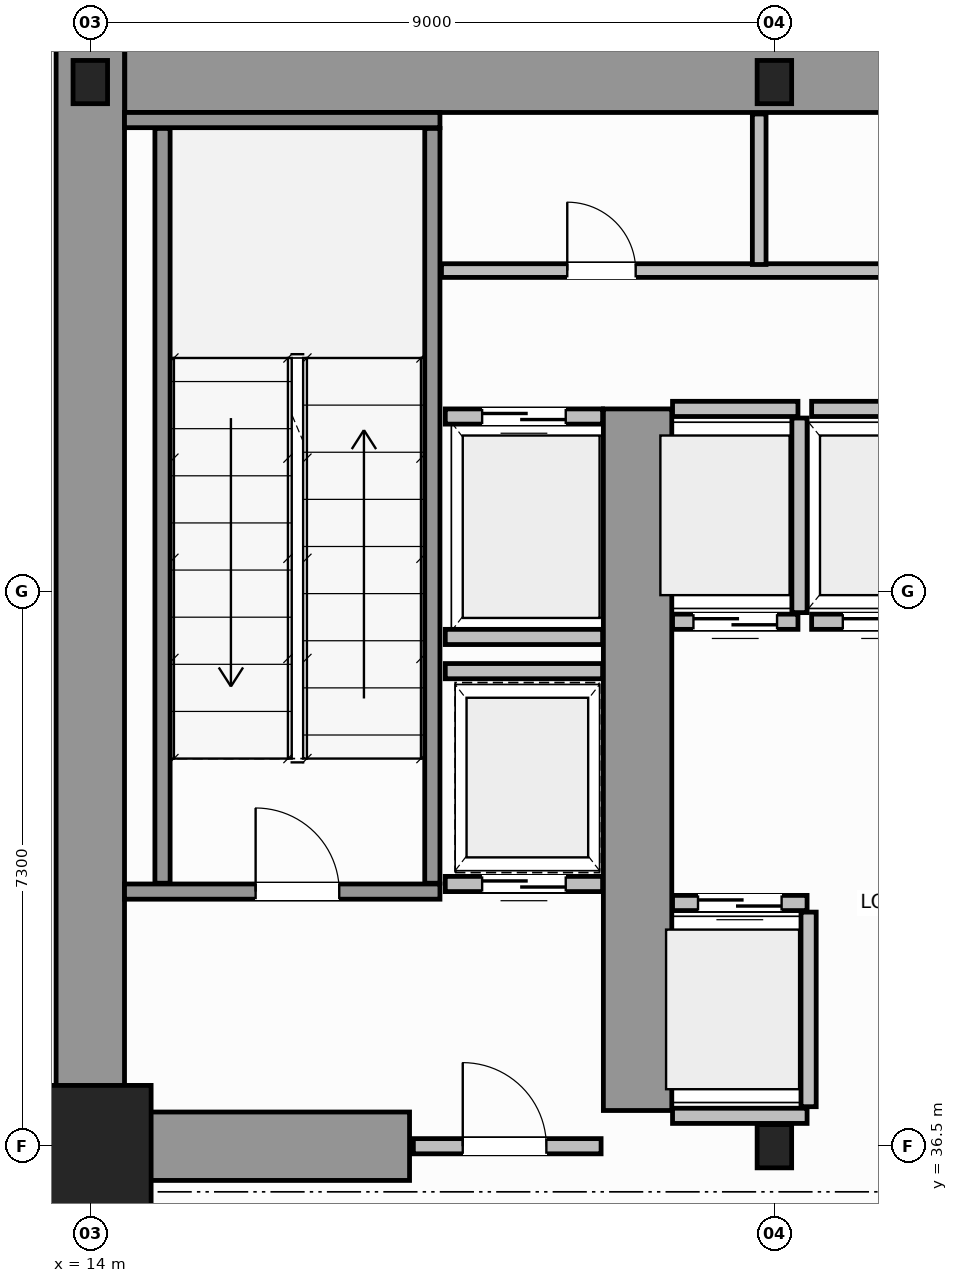
"""IFC4 building model, lengths in metres.
Left out: names, types, materials, properties, quantities, classifications, styles, units other than length and angle.
Written with IfcOpenShell. Run it as: python <this file> out.ifc"""

import sys

from ifc_helpers import new_model, si_unit, direction, frame, frame_2d, origin, origin_2d, place, context, subcontext, project, spatial, rectangle, i_section, extrude, source, transform, mapped, element, fill, save


model = new_model("IFC4")
c1 = context("Model", 3, precision=1e-05, world=origin(), true_north=direction((0.0, 1.0)))
c2 = subcontext(c1, "Body", "Model", "MODEL_VIEW")
j1 = project(units=[si_unit("LENGTHUNIT", "METRE"), si_unit("PLANEANGLEUNIT", "RADIAN")], contexts=[c1])
p1 = place(None, origin())
s1 = spatial("IfcSite", under=j1, at=p1, CompositionType="ELEMENT")
p2 = place(p1, origin())
s2 = spatial("IfcBuilding", under=s1, at=p2, CompositionType="ELEMENT")
p3 = place(p2, origin())
s3 = spatial("IfcBuildingStorey", under=s2, at=p3, CompositionType="ELEMENT", Elevation=0.0)
m1 = source(origin(), c2, "Body", "SweptSolid", [
    extrude(rectangle(XDim=1.6, YDim=1.6, at=origin_2d()), origin(), (0.0, 0.0, 1.0), 5.6),
])
p4 = place(p3, frame((14.0, 36.5, 0.0), z_axis=(0.0, 0.0, 1.0), x_axis=(1.0, 0.0, 0.0)))
e1 = element("IfcColumn", 1, at=p4, inside=s3, PredefinedType="COLUMN", context=c2, shape_type="MappedRepresentation", body=[
    mapped(m1, transform((0.0, 0.0, 0.0), scale=1.0)),
])
m2 = source(origin(), c2, "Body", "SweptSolid", [
    extrude(i_section(OverallWidth=0.454, OverallDepth=0.569, WebThickness=0.078, FlangeThickness=0.08, FilletRadius=0.015, at=origin_2d()), origin(), (0.0, 0.0, 1.0), 5.6),
])
for number, where, z_axis, x_axis in (
    (2, (23.0, 36.5, 0.0), (0.0, 0.0, 1.0), (1.0, 0.0, 0.0)),
    (3, (14.0, 50.5, 0.0), (0.0, 0.0, 1.0), (1.0, 0.0, 0.0)),
    (4, (23.0, 50.5, 0.0), (0.0, 0.0, 1.0), (1.0, 0.0, 0.0)),
):
    element("IfcColumn", number, at=place(p3, frame(where, z_axis=z_axis, x_axis=x_axis)), inside=s3, PredefinedType="COLUMN", context=c2, shape_type="MappedRepresentation", body=[
        mapped(m2, transform((0.0, 0.0, 0.0), scale=1.0)),
    ])
p5 = place(p3, frame((14.454, 50.55, 0.0), z_axis=(0.0, 0.0, 1.0), x_axis=(1.0, 0.0, 0.0)))
e5 = element("IfcWall", 5, at=p5, inside=s3, PredefinedType="SHEAR", context=c2, shape_type="SweptSolid", body=[
    extrude(rectangle(XDim=19.544, YDim=0.9, at=frame_2d((9.772, 0.0))), origin(), (0.0, 0.0, 1.0), 5.6),
])
p6 = place(p3, frame((14.0, 36.5, 0.0), z_axis=(0.0, 0.0, 1.0), x_axis=(0.0, 1.0, 0.0)))
e6 = element("IfcWall", 6, at=p6, inside=s3, PredefinedType="SHEAR", context=c2, shape_type="SweptSolid", body=[
    extrude(rectangle(XDim=14.5, YDim=0.9, at=frame_2d((7.25, 0.0))), origin(), (0.0, 0.0, 1.0), 5.6),
])
p7 = place(p3, frame((14.47, 36.5, 0.0), z_axis=(0.0, 0.0, 1.0), x_axis=(1.0, 0.0, 0.0)))
e7 = element("IfcWall", 7, at=p7, inside=s3, PredefinedType="SHEAR", context=c2, shape_type="SweptSolid", body=[
    extrude(rectangle(XDim=3.73, YDim=0.9, at=frame_2d((1.865, 0.0))), origin(), (0.0, 0.0, 1.0), 4.12),
])
p8 = place(p3, frame((21.2, 36.97, 0.0), z_axis=(0.0, 0.0, 1.0), x_axis=(0.0, 1.0, 0.0)))
e8 = element("IfcWall", 8, at=p8, inside=s3, PredefinedType="SHEAR", context=c2, shape_type="SweptSolid", body=[
    extrude(rectangle(XDim=9.23, YDim=0.9, at=frame_2d((4.615, 0.0))), origin(), (0.0, 0.0, 1.0), 5.6),
])
p9 = place(p3, frame((14.45, 39.85, 0.0), z_axis=(0.0, 0.0, 1.0), x_axis=(1.0, 0.0, 0.0)))
e9 = element("IfcWall", 9, at=p9, inside=s3, PredefinedType="SOLIDWALL", context=c2, shape_type="SweptSolid", body=[
    extrude(rectangle(XDim=4.15, YDim=0.2, at=frame_2d((2.075, 0.0))), origin(), (0.0, 0.0, 1.0), 5.6),
])
p10 = place(p9, frame((1.725, 0.0, 0.0)))
e10 = element("IfcOpeningElement", 10, at=p10, cuts=e9, PredefinedType="OPENING", context=c2, shape_type="SweptSolid", body=[
    extrude(rectangle(XDim=1.1, YDim=2.15, at=frame_2d((0.55, 1.075))), frame((0.0, 0.11, 0.0), z_axis=(0.0, -1.0, 0.0), x_axis=(1.0, 0.0, 0.0)), (0.0, 0.0, 1.0), 0.22),
])
p11 = place(p3, frame((14.45, 50.0, 0.0), z_axis=(0.0, 0.0, 1.0), x_axis=(1.0, 0.0, 0.0)))
e11 = element("IfcWall", 11, at=p11, inside=s3, PredefinedType="SOLIDWALL", context=c2, shape_type="SweptSolid", body=[
    extrude(rectangle(XDim=4.15, YDim=0.2, at=frame_2d((2.075, 0.0))), origin(), (0.0, 0.0, 1.0), 5.6),
])
for number, where, z_axis, x_axis in (
    (12, (14.95, 39.96, 0.0), (0.0, 0.0, 1.0), (0.0, 1.0, 0.0)),
    (13, (18.5, 39.96, 0.0), (0.0, 0.0, 1.0), (0.0, 1.0, 0.0)),
):
    element("IfcWall", number, at=place(p3, frame(where, z_axis=z_axis, x_axis=x_axis)), inside=s3, PredefinedType="SOLIDWALL", context=c2, shape_type="SweptSolid", body=[
        extrude(rectangle(XDim=9.93, YDim=0.2, at=frame_2d((4.965, 0.0))), origin(), (0.0, 0.0, 1.0), 5.6),
    ])
p12 = place(p3, frame((18.25, 36.5, 0.0), z_axis=(0.0, 0.0, 1.0), x_axis=(1.0, 0.0, 0.0)))
e14 = element("IfcWall", 14, at=p12, inside=s3, PredefinedType="SOLIDWALL", context=c2, shape_type="SweptSolid", body=[
    extrude(rectangle(XDim=2.47, YDim=0.2, at=frame_2d((1.235, 0.0))), origin(), (0.0, 0.0, 1.0), 4.11),
])
p13 = place(p12, frame((0.65, 0.0, 0.0)))
e15 = element("IfcOpeningElement", 15, at=p13, cuts=e14, PredefinedType="OPENING", context=c2, shape_type="SweptSolid", body=[
    extrude(rectangle(XDim=1.1, YDim=2.15, at=frame_2d((0.55, 1.075))), frame((0.0, 0.11, 0.0), z_axis=(0.0, -1.0, 0.0), x_axis=(1.0, 0.0, 0.0)), (0.0, 0.0, 1.0), 0.22),
])
p14 = place(p3, frame((21.66, 39.7, 0.0), z_axis=(0.0, 0.0, 1.0), x_axis=(1.0, 0.0, 0.0)))
e16 = element("IfcWall", 16, at=p14, inside=s3, PredefinedType="SOLIDWALL", context=c2, shape_type="SweptSolid", body=[
    extrude(rectangle(XDim=1.77, YDim=0.2, at=frame_2d((0.885, 0.0))), origin(), (0.0, 0.0, 1.0), 5.32),
])
p15 = place(p14, frame((0.335, 0.0, 0.0)))
e17 = element("IfcOpeningElement", 17, at=p15, cuts=e16, PredefinedType="OPENING", context=c2, shape_type="SweptSolid", body=[
    extrude(rectangle(XDim=1.1, YDim=2.15, at=frame_2d((0.55, 1.075))), frame((0.0, 0.11, 0.0), z_axis=(0.0, -1.0, 0.0), x_axis=(1.0, 0.0, 0.0)), (0.0, 0.0, 1.0), 0.22),
])
p16 = place(p3, frame((21.66, 36.9, 0.0), z_axis=(0.0, 0.0, 1.0), x_axis=(1.0, 0.0, 0.0)))
e18 = element("IfcWall", 18, at=p16, inside=s3, PredefinedType="SOLIDWALL", context=c2, shape_type="SweptSolid", body=[
    extrude(rectangle(XDim=1.77, YDim=0.2, at=frame_2d((0.885, 0.0))), origin(), (0.0, 0.0, 1.0), 4.11),
])
p17 = place(p3, frame((23.45, 37.02, 0.0), z_axis=(0.0, 0.0, 1.0), x_axis=(0.0, 1.0, 0.0)))
e19 = element("IfcWall", 19, at=p17, inside=s3, PredefinedType="SOLIDWALL", context=c2, shape_type="SweptSolid", body=[
    extrude(rectangle(XDim=2.56, YDim=0.2, at=frame_2d((1.28, 0.0))), origin(), (0.0, 0.0, 1.0), 5.32),
])
p18 = place(p3, frame((21.66, 43.4, 0.0), z_axis=(0.0, 0.0, 1.0), x_axis=(1.0, 0.0, 0.0)))
e20 = element("IfcWall", 20, at=p18, inside=s3, PredefinedType="SOLIDWALL", context=c2, shape_type="SweptSolid", body=[
    extrude(rectangle(XDim=1.65, YDim=0.2, at=frame_2d((0.825, 0.0))), origin(), (0.0, 0.0, 1.0), 5.32),
])
p19 = place(p18, frame((0.275, 0.0, 0.0)))
e21 = element("IfcOpeningElement", 21, at=p19, cuts=e20, PredefinedType="OPENING", context=c2, shape_type="SweptSolid", body=[
    extrude(rectangle(XDim=1.1, YDim=2.15, at=frame_2d((0.55, 1.075))), frame((0.0, 0.11, 0.0), z_axis=(0.0, -1.0, 0.0), x_axis=(1.0, 0.0, 0.0)), (0.0, 0.0, 1.0), 0.22),
])
p20 = place(p3, frame((21.66, 46.2, 0.0), z_axis=(0.0, 0.0, 1.0), x_axis=(1.0, 0.0, 0.0)))
e22 = element("IfcWall", 22, at=p20, inside=s3, PredefinedType="SOLIDWALL", context=c2, shape_type="SweptSolid", body=[
    extrude(rectangle(XDim=1.65, YDim=0.2, at=frame_2d((0.825, 0.0))), origin(), (0.0, 0.0, 1.0), 5.32),
])
p21 = place(p3, frame((23.33, 43.52, 0.0), z_axis=(0.0, 0.0, 1.0), x_axis=(0.0, 1.0, 0.0)))
e23 = element("IfcWall", 23, at=p21, inside=s3, PredefinedType="SOLIDWALL", context=c2, shape_type="SweptSolid", body=[
    extrude(rectangle(XDim=2.56, YDim=0.2, at=frame_2d((1.28, 0.0))), origin(), (0.0, 0.0, 1.0), 5.32),
])
p22 = place(p3, frame((23.49, 43.4, 0.0), z_axis=(0.0, 0.0, 1.0), x_axis=(1.0, 0.0, 0.0)))
e24 = element("IfcWall", 24, at=p22, inside=s3, PredefinedType="SOLIDWALL", context=c2, shape_type="SweptSolid", body=[
    extrude(rectangle(XDim=1.92, YDim=0.2, at=frame_2d((0.96, 0.0))), origin(), (0.0, 0.0, 1.0), 5.32),
])
p23 = place(p22, frame((0.41, 0.0, 0.0)))
e25 = element("IfcOpeningElement", 25, at=p23, cuts=e24, PredefinedType="OPENING", context=c2, shape_type="SweptSolid", body=[
    extrude(rectangle(XDim=1.1, YDim=2.15, at=frame_2d((0.55, 1.075))), frame((0.0, 0.11, 0.0), z_axis=(0.0, -1.0, 0.0), x_axis=(1.0, 0.0, 0.0)), (0.0, 0.0, 1.0), 0.22),
])
p24 = place(p3, frame((23.49, 46.2, 0.0), z_axis=(0.0, 0.0, 1.0), x_axis=(1.0, 0.0, 0.0)))
e26 = element("IfcWall", 26, at=p24, inside=s3, PredefinedType="SOLIDWALL", context=c2, shape_type="SweptSolid", body=[
    extrude(rectangle(XDim=1.92, YDim=0.2, at=frame_2d((0.96, 0.0))), origin(), (0.0, 0.0, 1.0), 5.32),
])
p25 = place(p3, frame((18.67, 46.1, 0.0), z_axis=(0.0, 0.0, 1.0), x_axis=(1.0, 0.0, 0.0)))
e27 = element("IfcWall", 27, at=p25, inside=s3, PredefinedType="SOLIDWALL", context=c2, shape_type="SweptSolid", body=[
    extrude(rectangle(XDim=2.07, YDim=0.2, at=frame_2d((1.035, 0.0))), origin(), (0.0, 0.0, 1.0), 5.32),
])
p26 = place(p25, frame((0.485, 0.0, 0.0)))
e28 = element("IfcOpeningElement", 28, at=p26, cuts=e27, PredefinedType="OPENING", context=c2, shape_type="SweptSolid", body=[
    extrude(rectangle(XDim=1.1, YDim=2.15, at=frame_2d((0.55, 1.075))), frame((0.0, 0.11, 0.0), z_axis=(0.0, -1.0, 0.0), x_axis=(1.0, 0.0, 0.0)), (0.0, 0.0, 1.0), 0.22),
])
p27 = place(p3, frame((18.67, 43.2, 0.0), z_axis=(0.0, 0.0, 1.0), x_axis=(1.0, 0.0, 0.0)))
e29 = element("IfcWall", 29, at=p27, inside=s3, PredefinedType="SOLIDWALL", context=c2, shape_type="SweptSolid", body=[
    extrude(rectangle(XDim=2.07, YDim=0.2, at=frame_2d((1.035, 0.0))), origin(), (0.0, 0.0, 1.0), 5.32),
])
p28 = place(p3, frame((18.67, 39.95, 0.0), z_axis=(0.0, 0.0, 1.0), x_axis=(1.0, 0.0, 0.0)))
e30 = element("IfcWall", 30, at=p28, inside=s3, PredefinedType="SOLIDWALL", context=c2, shape_type="SweptSolid", body=[
    extrude(rectangle(XDim=2.07, YDim=0.2, at=frame_2d((1.035, 0.0))), origin(), (0.0, 0.0, 1.0), 5.32),
])
p29 = place(p28, frame((0.485, 0.0, 0.0)))
e31 = element("IfcOpeningElement", 31, at=p29, cuts=e30, PredefinedType="OPENING", context=c2, shape_type="SweptSolid", body=[
    extrude(rectangle(XDim=1.1, YDim=2.15, at=frame_2d((0.55, 1.075))), frame((0.0, 0.11, 0.0), z_axis=(0.0, -1.0, 0.0), x_axis=(1.0, 0.0, 0.0)), (0.0, 0.0, 1.0), 0.22),
])
p30 = place(p3, frame((18.67, 42.75, 0.0), z_axis=(0.0, 0.0, 1.0), x_axis=(1.0, 0.0, 0.0)))
e32 = element("IfcWall", 32, at=p30, inside=s3, PredefinedType="SOLIDWALL", context=c2, shape_type="SweptSolid", body=[
    extrude(rectangle(XDim=2.07, YDim=0.2, at=frame_2d((1.035, 0.0))), origin(), (0.0, 0.0, 1.0), 5.32),
])
p31 = place(p3, frame((18.62, 48.02, 0.0), z_axis=(0.0, 0.0, 1.0), x_axis=(1.0, 0.0, 0.0)))
e33 = element("IfcWall", 33, at=p31, inside=s3, PredefinedType="PLUMBINGWALL", context=c2, shape_type="SweptSolid", body=[
    extrude(rectangle(XDim=30.76, YDim=0.18, at=frame_2d((15.38, 0.0))), origin(), (0.0, 0.0, 1.0), 5.32),
])
p32 = place(p31, frame((1.655, 0.0, 0.0)))
e34 = element("IfcOpeningElement", 34, at=p32, cuts=e33, PredefinedType="OPENING", context=c2, shape_type="SweptSolid", body=[
    extrude(rectangle(XDim=0.9, YDim=2.15, at=frame_2d((0.45, 1.075))), frame((0.0, 0.1, 0.0), z_axis=(0.0, -1.0, 0.0), x_axis=(1.0, 0.0, 0.0)), (0.0, 0.0, 1.0), 0.2),
])
p33 = place(p31, frame((6.03, 0.0, 0.0)))
e35 = element("IfcOpeningElement", 35, at=p33, cuts=e33, PredefinedType="OPENING", context=c2, shape_type="SweptSolid", body=[
    extrude(rectangle(XDim=0.9, YDim=2.15, at=frame_2d((0.45, 1.075))), frame((0.0, 0.1, 0.0), z_axis=(0.0, -1.0, 0.0), x_axis=(1.0, 0.0, 0.0)), (0.0, 0.0, 1.0), 0.2),
])
p34 = place(p31, frame((10.93, 0.0, 0.0)))
e36 = element("IfcOpeningElement", 36, at=p34, cuts=e33, PredefinedType="OPENING", context=c2, shape_type="SweptSolid", body=[
    extrude(rectangle(XDim=0.9, YDim=2.15, at=frame_2d((0.45, 1.075))), frame((0.0, 0.1, 0.0), z_axis=(0.0, -1.0, 0.0), x_axis=(1.0, 0.0, 0.0)), (0.0, 0.0, 1.0), 0.2),
])
p35 = place(p31, frame((16.13, 0.0, 0.0)))
e37 = element("IfcOpeningElement", 37, at=p35, cuts=e33, PredefinedType="OPENING", context=c2, shape_type="SweptSolid", body=[
    extrude(rectangle(XDim=0.9, YDim=2.15, at=frame_2d((0.45, 1.075))), frame((0.0, 0.1, 0.0), z_axis=(0.0, -1.0, 0.0), x_axis=(1.0, 0.0, 0.0)), (0.0, 0.0, 1.0), 0.2),
])
p36 = place(p31, frame((21.73, 0.0, 0.0)))
e38 = element("IfcOpeningElement", 38, at=p36, cuts=e33, PredefinedType="OPENING", context=c2, shape_type="SweptSolid", body=[
    extrude(rectangle(XDim=0.9, YDim=2.15, at=frame_2d((0.45, 1.075))), frame((0.0, 0.1, 0.0), z_axis=(0.0, -1.0, 0.0), x_axis=(1.0, 0.0, 0.0)), (0.0, 0.0, 1.0), 0.2),
])
p37 = place(p31, frame((27.505, 0.0, 0.0)))
e39 = element("IfcOpeningElement", 39, at=p37, cuts=e33, PredefinedType="OPENING", context=c2, shape_type="SweptSolid", body=[
    extrude(rectangle(XDim=0.9, YDim=2.15, at=frame_2d((0.45, 1.075))), frame((0.0, 0.1, 0.0), z_axis=(0.0, -1.0, 0.0), x_axis=(1.0, 0.0, 0.0)), (0.0, 0.0, 1.0), 0.2),
])
p38 = place(p3, frame((22.8, 48.1, 0.0), z_axis=(0.0, 0.0, 1.0), x_axis=(0.0, 1.0, 0.0)))
e40 = element("IfcWall", 40, at=p38, inside=s3, PredefinedType="PLUMBINGWALL", context=c2, shape_type="SweptSolid", body=[
    extrude(rectangle(XDim=1.98, YDim=0.18, at=frame_2d((0.99, 0.0))), origin(), (0.0, 0.0, 1.0), 4.4),
])
p39 = place(p3, frame((5.35, 36.55, 0.0), z_axis=(0.0, 0.0, 1.0), x_axis=(1.0, 0.0, 0.0)))
e41 = element("IfcWall", 41, at=p39, inside=s3, PredefinedType="SOLIDWALL", context=c2, shape_type="SweptSolid", body=[
    extrude(rectangle(XDim=8.55, YDim=0.2, at=frame_2d((4.275, 0.0))), origin(), (0.0, 0.0, 1.0), 4.4),
])
p40 = place(p39, frame((3.8, 0.0, 0.0)))
e42 = element("IfcOpeningElement", 42, at=p40, cuts=e41, PredefinedType="OPENING", context=c2, shape_type="SweptSolid", body=[
    extrude(rectangle(XDim=1.1, YDim=2.15, at=frame_2d((0.55, 1.075))), frame((0.0, 0.11, 0.0), z_axis=(0.0, -1.0, 0.0), x_axis=(1.0, 0.0, 0.0)), (0.0, 0.0, 1.0), 0.22),
])
m3 = source(origin(), c2, "Body", "SweptSolid", [
    extrude(rectangle(XDim=1.1, YDim=2.15, at=frame_2d((0.55, 1.075))), frame((0.0, 0.025, 0.0), z_axis=(0.0, -1.0, 0.0), x_axis=(1.0, 0.0, 0.0)), (0.0, 0.0, 1.0), 0.05),
])
p41 = place(p10, origin())
e43 = element("IfcDoor", 43, at=p41, inside=s3, OperationType="SINGLE_SWING_LEFT", PredefinedType="DOOR", context=c2, shape_type="MappedRepresentation", body=[
    mapped(m3, transform((0.0, 0.0, 0.0), scale=1.0)),
])
fill(e10, e43)
p42 = place(p13, origin())
e44 = element("IfcDoor", 44, at=p42, inside=s3, OperationType="SINGLE_SWING_RIGHT", PredefinedType="DOOR", context=c2, shape_type="MappedRepresentation", body=[
    mapped(m3, transform((0.0, 0.0, 0.0), scale=1.0)),
])
fill(e15, e44)
p43 = place(p15, origin())
e45 = element("IfcDoor", 45, at=p43, inside=s3, OperationType="DOUBLE_DOOR_SLIDING", PredefinedType="DOOR", context=c2, shape_type="MappedRepresentation", body=[
    mapped(m3, transform((0.0, 0.0, 0.0), scale=1.0)),
])
fill(e17, e45)
p44 = place(p19, origin())
e46 = element("IfcDoor", 46, at=p44, inside=s3, OperationType="DOUBLE_DOOR_SLIDING", PredefinedType="DOOR", context=c2, shape_type="MappedRepresentation", body=[
    mapped(m3, transform((0.0, 0.0, 0.0), scale=1.0)),
])
fill(e21, e46)
p45 = place(p23, origin())
e47 = element("IfcDoor", 47, at=p45, inside=s3, OperationType="DOUBLE_DOOR_SLIDING", PredefinedType="DOOR", context=c2, shape_type="MappedRepresentation", body=[
    mapped(m3, transform((0.0, 0.0, 0.0), scale=1.0)),
])
fill(e25, e47)
p46 = place(p26, origin())
e48 = element("IfcDoor", 48, at=p46, inside=s3, OperationType="DOUBLE_DOOR_SLIDING", PredefinedType="DOOR", context=c2, shape_type="MappedRepresentation", body=[
    mapped(m3, transform((0.0, 0.0, 0.0), scale=1.0)),
])
fill(e28, e48)
p47 = place(p29, origin())
e49 = element("IfcDoor", 49, at=p47, inside=s3, OperationType="DOUBLE_DOOR_SLIDING", PredefinedType="DOOR", context=c2, shape_type="MappedRepresentation", body=[
    mapped(m3, transform((0.0, 0.0, 0.0), scale=1.0)),
])
fill(e31, e49)
m4 = source(origin(), c2, "Body", "SweptSolid", [
    extrude(rectangle(XDim=0.9, YDim=2.15, at=frame_2d((0.45, 1.075))), frame((0.0, 0.025, 0.0), z_axis=(0.0, -1.0, 0.0), x_axis=(1.0, 0.0, 0.0)), (0.0, 0.0, 1.0), 0.05),
])
p48 = place(p32, origin())
e50 = element("IfcDoor", 50, at=p48, inside=s3, OperationType="SINGLE_SWING_LEFT", PredefinedType="DOOR", context=c2, shape_type="MappedRepresentation", body=[
    mapped(m4, transform((0.0, 0.0, 0.0), scale=1.0)),
])
fill(e34, e50)
save(model, sys.argv[1])
